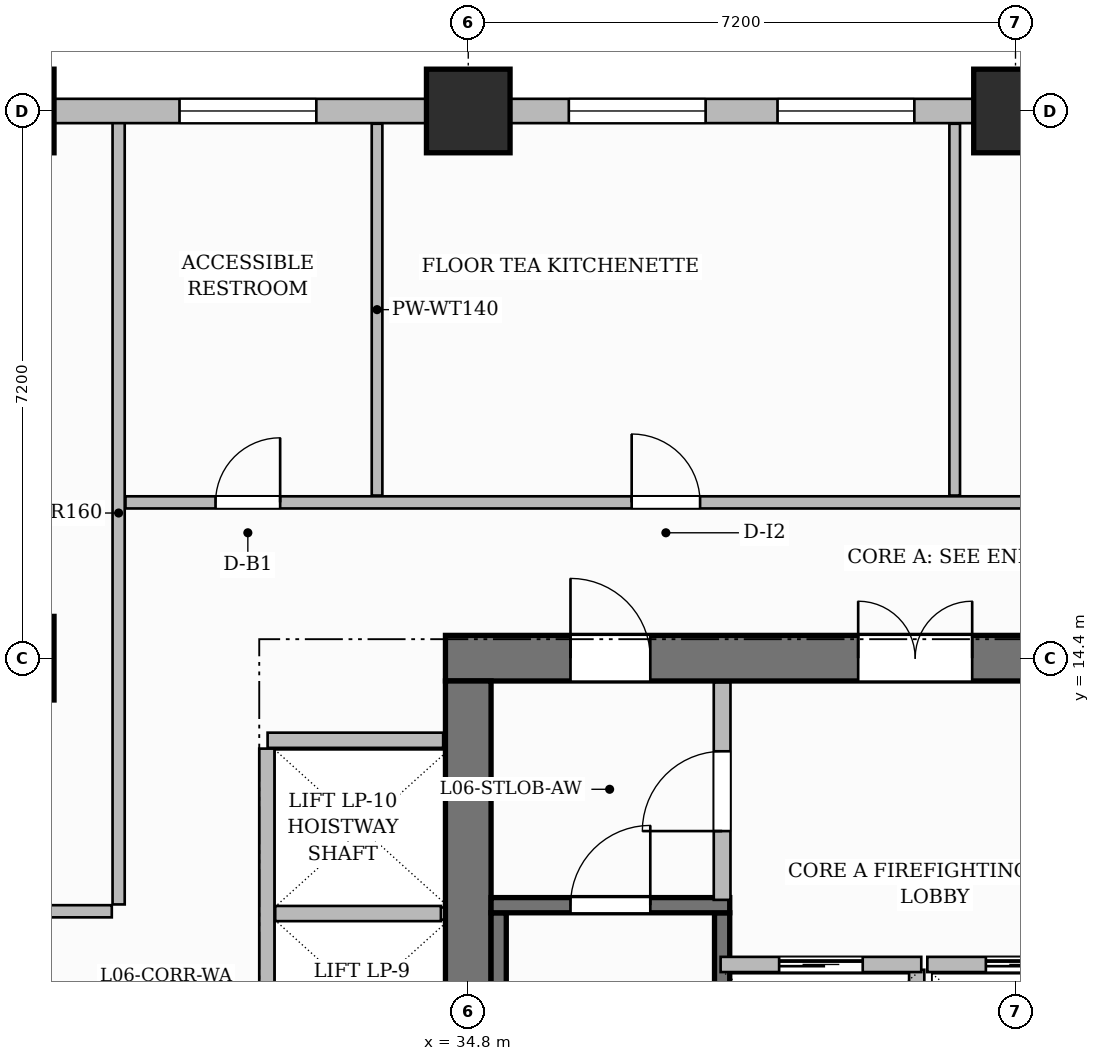
"""IFC4 building model, lengths in metres.
Left out: names, types, materials, properties, quantities, classifications, styles, units other than length and angle.
Written with IfcOpenShell. Run it as: python <this file> out.ifc"""

import sys

from ifc_helpers import new_model, si_unit, direction, frame, frame_2d, origin, origin_2d, place, context, subcontext, project, spatial, rectangle, extrude, source, transform, mapped, element, fill, save


model = new_model("IFC4")
c1 = context("Model", 3, precision=1e-05, world=origin(), true_north=direction((0.0, 1.0)))
c2 = subcontext(c1, "Body", "Model", "MODEL_VIEW")
j1 = project(units=[si_unit("LENGTHUNIT", "METRE"), si_unit("PLANEANGLEUNIT", "RADIAN")], contexts=[c1])
p1 = place(None, origin())
s1 = spatial("IfcSite", under=j1, at=p1, CompositionType="ELEMENT")
p2 = place(p1, origin())
s2 = spatial("IfcBuilding", under=s1, at=p2, CompositionType="ELEMENT")
p3 = place(p2, frame((0.0, 0.0, 32.4)))
s3 = spatial("IfcBuildingStorey", under=s2, at=p3, CompositionType="ELEMENT", Elevation=32.4)
p4 = place(p3, frame((34.5, 14.4, 0.0), z_axis=(0.0, 0.0, 1.0), x_axis=(1.0, 0.0, 0.0)))
e1 = element("IfcWall", 1, at=p4, inside=s3, PredefinedType="SHEAR", context=c2, shape_type="SweptSolid", body=[
    extrude(rectangle(XDim=15.6, YDim=0.6, at=frame_2d((7.8, 0.0))), origin(), (0.0, 0.0, 1.0), 3.7),
])
p5 = place(p4, frame((5.43, 0.0, 0.0)))
e2 = element("IfcOpeningElement", 2, at=p5, cuts=e1, PredefinedType="OPENING", context=c2, shape_type="SweptSolid", body=[
    extrude(rectangle(XDim=1.5, YDim=2.2, at=frame_2d((0.75, 1.1))), frame((0.0, 0.31, 0.0), z_axis=(0.0, -1.0, 0.0), x_axis=(1.0, 0.0, 0.0)), (0.0, 0.0, 1.0), 0.62),
])
p6 = place(p4, frame((1.645, 0.0, 0.0)))
e3 = element("IfcOpeningElement", 3, at=p6, cuts=e1, PredefinedType="OPENING", context=c2, shape_type="SweptSolid", body=[
    extrude(rectangle(XDim=1.05, YDim=2.15, at=frame_2d((0.525, 1.075))), frame((0.0, 0.31, 0.0), z_axis=(0.0, -1.0, 0.0), x_axis=(1.0, 0.0, 0.0)), (0.0, 0.0, 1.0), 0.62),
])
p7 = place(p4, frame((11.275, 0.0, 0.0)))
e4 = element("IfcOpeningElement", 4, at=p7, cuts=e1, PredefinedType="OPENING", context=c2, shape_type="SweptSolid", body=[
    extrude(rectangle(XDim=1.05, YDim=2.15, at=frame_2d((0.525, 1.075))), frame((0.0, 0.31, 0.0), z_axis=(0.0, -1.0, 0.0), x_axis=(1.0, 0.0, 0.0)), (0.0, 0.0, 1.0), 0.62),
])
p8 = place(p3, frame((34.8, 3.9, 0.0), z_axis=(0.0, 0.0, 1.0), x_axis=(0.0, 1.0, 0.0)))
e5 = element("IfcWall", 5, at=p8, inside=s3, PredefinedType="SHEAR", context=c2, shape_type="SweptSolid", body=[
    extrude(rectangle(XDim=10.2, YDim=0.6, at=frame_2d((5.1, 0.0))), origin(), (0.0, 0.0, 1.0), 3.7),
])
m1 = source(origin(), c2, "Body", "SweptSolid", [
    extrude(rectangle(XDim=1.1, YDim=1.1, at=origin_2d()), origin(), (0.0, 0.0, 1.0), 3.7),
])
for number, where, z_axis, x_axis in (
    (6, (28.8, 14.4, 0.0), (0.0, 0.0, 1.0), (1.0, 0.0, 0.0)),
    (7, (28.8, 21.6, 0.0), (0.0, 0.0, 1.0), (1.0, 0.0, 0.0)),
    (8, (34.8, 21.6, 0.0), (0.0, 0.0, 1.0), (1.0, 0.0, 0.0)),
    (9, (42.0, 21.6, 0.0), (0.0, 0.0, 1.0), (1.0, 0.0, 0.0)),
):
    element("IfcColumn", number, at=place(p3, frame(where, z_axis=z_axis, x_axis=x_axis)), inside=s3, PredefinedType="COLUMN", context=c2, shape_type="MappedRepresentation", body=[
        mapped(m1, transform((0.0, 0.0, 0.0), scale=1.0)),
    ])
for number, where, z_axis, x_axis in (
    (10, (35.2, 4.1, 0.0), (0.0, 0.0, 1.0), (0.0, 1.0, 0.0)),
    (11, (38.14, 4.1, 0.0), (0.0, 0.0, 1.0), (0.0, 1.0, 0.0)),
):
    element("IfcWall", number, at=place(p3, frame(where, z_axis=z_axis, x_axis=x_axis)), inside=s3, PredefinedType="SHEAR", context=c2, shape_type="SweptSolid", body=[
        extrude(rectangle(XDim=6.95, YDim=0.2, at=frame_2d((3.475, 0.0))), origin(), (0.0, 0.0, 1.0), 3.7),
    ])
p9 = place(p3, frame((35.1, 11.15, 0.0), z_axis=(0.0, 0.0, 1.0), x_axis=(1.0, 0.0, 0.0)))
e12 = element("IfcWall", 12, at=p9, inside=s3, PredefinedType="SHEAR", context=c2, shape_type="SweptSolid", body=[
    extrude(rectangle(XDim=3.14, YDim=0.2, at=frame_2d((1.57, 0.0))), origin(), (0.0, 0.0, 1.0), 3.7),
])
p10 = place(p9, frame((1.045, 0.0, 0.0)))
e13 = element("IfcOpeningElement", 13, at=p10, cuts=e12, PredefinedType="OPENING", context=c2, shape_type="SweptSolid", body=[
    extrude(rectangle(XDim=1.05, YDim=2.2, at=frame_2d((0.525, 1.1))), frame((0.0, 0.11, 0.0), z_axis=(0.0, -1.0, 0.0), x_axis=(1.0, 0.0, 0.0)), (0.0, 0.0, 1.0), 0.22),
])
p11 = place(p3, frame((40.7, 8.12, 0.0), z_axis=(0.0, 0.0, 1.0), x_axis=(0.0, 1.0, 0.0)))
e14 = element("IfcWall", 14, at=p11, inside=s3, PredefinedType="PARTITIONING", context=c2, shape_type="SweptSolid", body=[
    extrude(rectangle(XDim=2.18, YDim=0.2, at=frame_2d((1.09, 0.0))), origin(), (0.0, 0.0, 1.0), 3.45),
])
p12 = place(p3, frame((38.14, 11.22, 0.0), z_axis=(0.0, 0.0, 1.0), x_axis=(0.0, 1.0, 0.0)))
e15 = element("IfcWall", 15, at=p12, inside=s3, PredefinedType="PARTITIONING", context=c2, shape_type="SweptSolid", body=[
    extrude(rectangle(XDim=2.86, YDim=0.22, at=frame_2d((1.43, 0.0))), origin(), (0.0, 0.0, 1.0), 3.45),
])
p13 = place(p12, frame((0.905, 0.0, 0.0)))
e16 = element("IfcOpeningElement", 16, at=p13, cuts=e15, PredefinedType="OPENING", context=c2, shape_type="SweptSolid", body=[
    extrude(rectangle(XDim=1.05, YDim=2.15, at=frame_2d((0.525, 1.075))), frame((0.0, 0.12, 0.0), z_axis=(0.0, -1.0, 0.0), x_axis=(1.0, 0.0, 0.0)), (0.0, 0.0, 1.0), 0.24),
])
p14 = place(p3, frame((32.16, 13.32, 0.0), z_axis=(0.0, 0.0, 1.0), x_axis=(1.0, 0.0, 0.0)))
e17 = element("IfcWall", 17, at=p14, inside=s3, PredefinedType="PARTITIONING", context=c2, shape_type="SweptSolid", body=[
    extrude(rectangle(XDim=2.31, YDim=0.2, at=frame_2d((1.155, 0.0))), origin(), (0.0, 0.0, 1.0), 3.45),
])
p15 = place(p3, frame((32.15, 4.39, 0.0), z_axis=(0.0, 0.0, 1.0), x_axis=(0.0, 1.0, 0.0)))
e18 = element("IfcWall", 18, at=p15, inside=s3, PredefinedType="PARTITIONING", context=c2, shape_type="SweptSolid", body=[
    extrude(rectangle(XDim=8.82, YDim=0.2, at=frame_2d((4.41, 0.0))), origin(), (0.0, 0.0, 1.0), 3.45),
])
p16 = place(p3, frame((32.26, 11.04, 0.0), z_axis=(0.0, 0.0, 1.0), x_axis=(1.0, 0.0, 0.0)))
e19 = element("IfcWall", 19, at=p16, inside=s3, PredefinedType="PARTITIONING", context=c2, shape_type="SweptSolid", body=[
    extrude(rectangle(XDim=2.18, YDim=0.2, at=frame_2d((1.09, 0.0))), origin(), (0.0, 0.0, 1.0), 3.45),
])
p17 = place(p3, frame((14.568, 11.07, 0.0), z_axis=(0.0, 0.0, 1.0), x_axis=(1.0, 0.0, 0.0)))
e20 = element("IfcWall", 20, at=p17, inside=s3, PredefinedType="PARTITIONING", context=c2, shape_type="SweptSolid", body=[
    extrude(rectangle(XDim=15.542, YDim=0.16, at=frame_2d((7.771, 0.0))), origin(), (0.0, 0.0, 1.0), 3.45),
])
p18 = place(p17, frame((2.918, 0.0, 0.0)))
e21 = element("IfcOpeningElement", 21, at=p18, cuts=e20, PredefinedType="OPENING", context=c2, shape_type="SweptSolid", body=[
    extrude(rectangle(XDim=1.0, YDim=2.2, at=frame_2d((0.5, 1.1))), frame((0.0, 0.09, 0.0), z_axis=(0.0, -1.0, 0.0), x_axis=(1.0, 0.0, 0.0)), (0.0, 0.0, 1.0), 0.18),
])
p19 = place(p17, frame((6.647, 0.0, 0.0)))
e22 = element("IfcOpeningElement", 22, at=p19, cuts=e20, PredefinedType="OPENING", context=c2, shape_type="SweptSolid", body=[
    extrude(rectangle(XDim=1.05, YDim=2.25, at=frame_2d((0.525, 1.125))), frame((0.0, 0.09, 0.0), z_axis=(0.0, -1.0, 0.0), x_axis=(1.0, 0.0, 0.0)), (0.0, 0.0, 1.0), 0.18),
])
p20 = place(p3, frame((30.2, 11.16, 0.0), z_axis=(0.0, 0.0, 1.0), x_axis=(0.0, 1.0, 0.0)))
e23 = element("IfcWall", 23, at=p20, inside=s3, PredefinedType="PARTITIONING", context=c2, shape_type="SweptSolid", body=[
    extrude(rectangle(XDim=10.3, YDim=0.16, at=frame_2d((5.15, 0.0))), origin(), (0.0, 0.0, 1.0), 3.45),
])
p21 = place(p3, frame((30.29, 16.45, 0.0), z_axis=(0.0, 0.0, 1.0), x_axis=(1.0, 0.0, 0.0)))
e24 = element("IfcWall", 24, at=p21, inside=s3, PredefinedType="PARTITIONING", context=c2, shape_type="SweptSolid", body=[
    extrude(rectangle(XDim=19.37, YDim=0.16, at=frame_2d((9.685, 0.0))), origin(), (0.0, 0.0, 1.0), 3.45),
])
p22 = place(p21, frame((1.185, 0.0, 0.0)))
e25 = element("IfcOpeningElement", 25, at=p22, cuts=e24, PredefinedType="OPENING", context=c2, shape_type="SweptSolid", body=[
    extrude(rectangle(XDim=0.85, YDim=2.1, at=frame_2d((0.425, 1.05))), frame((0.0, 0.09, 0.0), z_axis=(0.0, -1.0, 0.0), x_axis=(1.0, 0.0, 0.0)), (0.0, 0.0, 1.0), 0.18),
])
p23 = place(p21, frame((6.66, 0.0, 0.0)))
e26 = element("IfcOpeningElement", 26, at=p23, cuts=e24, PredefinedType="OPENING", context=c2, shape_type="SweptSolid", body=[
    extrude(rectangle(XDim=0.9, YDim=2.15, at=frame_2d((0.45, 1.075))), frame((0.0, 0.09, 0.0), z_axis=(0.0, -1.0, 0.0), x_axis=(1.0, 0.0, 0.0)), (0.0, 0.0, 1.0), 0.18),
])
p24 = place(p21, frame((14.46, 0.0, 0.0)))
e27 = element("IfcOpeningElement", 27, at=p24, cuts=e24, PredefinedType="OPENING", context=c2, shape_type="SweptSolid", body=[
    extrude(rectangle(XDim=1.4, YDim=2.35, at=frame_2d((0.7, 1.175))), frame((0.0, 0.09, 0.0), z_axis=(0.0, -1.0, 0.0), x_axis=(1.0, 0.0, 0.0)), (0.0, 0.0, 1.0), 0.18),
])
for number, where, z_axis, x_axis in (
    (28, (33.6, 16.54, 0.0), (0.0, 0.0, 1.0), (0.0, 1.0, 0.0)),
    (29, (41.2, 16.54, 0.0), (0.0, 0.0, 1.0), (0.0, 1.0, 0.0)),
):
    element("IfcWall", number, at=place(p3, frame(where, z_axis=z_axis, x_axis=x_axis)), inside=s3, PredefinedType="PARTITIONING", context=c2, shape_type="SweptSolid", body=[
        extrude(rectangle(XDim=4.892, YDim=0.14, at=frame_2d((2.446, 0.0))), origin(), (0.0, 0.0, 1.0), 3.45),
    ])
p25 = place(p3, frame((38.12, 10.37, 0.0), z_axis=(0.0, 0.0, 1.0), x_axis=(1.0, 0.0, 0.0)))
e30 = element("IfcWall", 30, at=p25, inside=s3, PredefinedType="PARTITIONING", context=c2, shape_type="SweptSolid", body=[
    extrude(rectangle(XDim=2.64, YDim=0.2, at=frame_2d((1.32, 0.0))), origin(), (0.0, 0.0, 1.0), 3.45),
])
p26 = place(p25, frame((0.77, 0.0, 0.0)))
e31 = element("IfcOpeningElement", 31, at=p26, cuts=e30, PredefinedType="OPENING", context=c2, shape_type="SweptSolid", body=[
    extrude(rectangle(XDim=1.1, YDim=2.2, at=frame_2d((0.55, 1.1))), frame((0.0, 0.11, 0.0), z_axis=(0.0, -1.0, 0.0), x_axis=(1.0, 0.0, 0.0)), (0.0, 0.0, 1.0), 0.22),
])
p27 = place(p3, frame((40.84, 10.37, 0.0), z_axis=(0.0, 0.0, 1.0), x_axis=(1.0, 0.0, 0.0)))
e32 = element("IfcWall", 32, at=p27, inside=s3, PredefinedType="PARTITIONING", context=c2, shape_type="SweptSolid", body=[
    extrude(rectangle(XDim=2.64, YDim=0.2, at=frame_2d((1.32, 0.0))), origin(), (0.0, 0.0, 1.0), 3.45),
])
p28 = place(p27, frame((0.77, 0.0, 0.0)))
e33 = element("IfcOpeningElement", 33, at=p28, cuts=e32, PredefinedType="OPENING", context=c2, shape_type="SweptSolid", body=[
    extrude(rectangle(XDim=1.1, YDim=2.2, at=frame_2d((0.55, 1.1))), frame((0.0, 0.11, 0.0), z_axis=(0.0, -1.0, 0.0), x_axis=(1.0, 0.0, 0.0)), (0.0, 0.0, 1.0), 0.22),
])
p29 = place(p3, frame((14.4, 21.6, 0.0), z_axis=(0.0, 0.0, 1.0), x_axis=(1.0, 0.0, 0.0)))
e34 = element("IfcWall", 34, at=p29, inside=s3, PredefinedType="SOLIDWALL", context=c2, shape_type="SweptSolid", body=[
    extrude(rectangle(XDim=43.2, YDim=0.32, at=frame_2d((21.6, 0.0))), origin(), (0.0, 0.0, 1.0), 2.885),
])
p30 = place(p29, frame((1.5, 0.0, 0.0)))
e35 = element("IfcOpeningElement", 35, at=p30, cuts=e34, PredefinedType="OPENING", context=c2, shape_type="SweptSolid", body=[
    extrude(rectangle(XDim=1.2, YDim=2.2, at=frame_2d((0.6, 1.1))), frame((0.0, 0.17, 0.0), z_axis=(0.0, -1.0, 0.0), x_axis=(1.0, 0.0, 0.0)), (0.0, 0.0, 1.0), 0.34),
])
p31 = place(p29, frame((3.336, 0.0, 0.8)))
e36 = element("IfcOpeningElement", 36, at=p31, cuts=e34, PredefinedType="OPENING", context=c2, shape_type="SweptSolid", body=[
    extrude(rectangle(XDim=1.4, YDim=1.85, at=frame_2d((0.7, 0.925))), frame((0.0, 0.17, 0.0), z_axis=(0.0, -1.0, 0.0), x_axis=(1.0, 0.0, 0.0)), (0.0, 0.0, 1.0), 0.34),
])
p32 = place(p29, frame((5.269, 0.0, 0.8)))
e37 = element("IfcOpeningElement", 37, at=p32, cuts=e34, PredefinedType="OPENING", context=c2, shape_type="SweptSolid", body=[
    extrude(rectangle(XDim=0.95, YDim=1.75, at=frame_2d((0.475, 0.875))), frame((0.0, 0.17, 0.0), z_axis=(0.0, -1.0, 0.0), x_axis=(1.0, 0.0, 0.0)), (0.0, 0.0, 1.0), 0.34),
])
p33 = place(p29, frame((8.525, 0.0, 0.8)))
e38 = element("IfcOpeningElement", 38, at=p33, cuts=e34, PredefinedType="OPENING", context=c2, shape_type="SweptSolid", body=[
    extrude(rectangle(XDim=1.8, YDim=1.85, at=frame_2d((0.9, 0.925))), frame((0.0, 0.17, 0.0), z_axis=(0.0, -1.0, 0.0), x_axis=(1.0, 0.0, 0.0)), (0.0, 0.0, 1.0), 0.34),
])
p34 = place(p29, frame((11.275, 0.0, 0.8)))
e39 = element("IfcOpeningElement", 39, at=p34, cuts=e34, PredefinedType="OPENING", context=c2, shape_type="SweptSolid", body=[
    extrude(rectangle(XDim=1.8, YDim=1.85, at=frame_2d((0.9, 0.925))), frame((0.0, 0.17, 0.0), z_axis=(0.0, -1.0, 0.0), x_axis=(1.0, 0.0, 0.0)), (0.0, 0.0, 1.0), 0.34),
])
p35 = place(p29, frame((16.601, 0.0, 0.8)))
e40 = element("IfcOpeningElement", 40, at=p35, cuts=e34, PredefinedType="OPENING", context=c2, shape_type="SweptSolid", body=[
    extrude(rectangle(XDim=1.8, YDim=1.85, at=frame_2d((0.9, 0.925))), frame((0.0, 0.17, 0.0), z_axis=(0.0, -1.0, 0.0), x_axis=(1.0, 0.0, 0.0)), (0.0, 0.0, 1.0), 0.34),
])
p36 = place(p29, frame((21.723, 0.0, 0.8)))
e41 = element("IfcOpeningElement", 41, at=p36, cuts=e34, PredefinedType="OPENING", context=c2, shape_type="SweptSolid", body=[
    extrude(rectangle(XDim=1.8, YDim=1.85, at=frame_2d((0.9, 0.925))), frame((0.0, 0.17, 0.0), z_axis=(0.0, -1.0, 0.0), x_axis=(1.0, 0.0, 0.0)), (0.0, 0.0, 1.0), 0.34),
])
p37 = place(p29, frame((24.469, 0.0, 0.8)))
e42 = element("IfcOpeningElement", 42, at=p37, cuts=e34, PredefinedType="OPENING", context=c2, shape_type="SweptSolid", body=[
    extrude(rectangle(XDim=1.8, YDim=1.85, at=frame_2d((0.9, 0.925))), frame((0.0, 0.17, 0.0), z_axis=(0.0, -1.0, 0.0), x_axis=(1.0, 0.0, 0.0)), (0.0, 0.0, 1.0), 0.34),
])
p38 = place(p29, frame((29.075, 0.0, 0.8)))
e43 = element("IfcOpeningElement", 43, at=p38, cuts=e34, PredefinedType="OPENING", context=c2, shape_type="SweptSolid", body=[
    extrude(rectangle(XDim=1.8, YDim=1.85, at=frame_2d((0.9, 0.925))), frame((0.0, 0.17, 0.0), z_axis=(0.0, -1.0, 0.0), x_axis=(1.0, 0.0, 0.0)), (0.0, 0.0, 1.0), 0.34),
])
p39 = place(p29, frame((32.125, 0.0, 0.8)))
e44 = element("IfcOpeningElement", 44, at=p39, cuts=e34, PredefinedType="OPENING", context=c2, shape_type="SweptSolid", body=[
    extrude(rectangle(XDim=1.8, YDim=1.85, at=frame_2d((0.9, 0.925))), frame((0.0, 0.17, 0.0), z_axis=(0.0, -1.0, 0.0), x_axis=(1.0, 0.0, 0.0)), (0.0, 0.0, 1.0), 0.34),
])
p40 = place(p29, frame((36.875, 0.0, 0.8)))
e45 = element("IfcOpeningElement", 45, at=p40, cuts=e34, PredefinedType="OPENING", context=c2, shape_type="SweptSolid", body=[
    extrude(rectangle(XDim=1.8, YDim=1.85, at=frame_2d((0.9, 0.925))), frame((0.0, 0.17, 0.0), z_axis=(0.0, -1.0, 0.0), x_axis=(1.0, 0.0, 0.0)), (0.0, 0.0, 1.0), 0.34),
])
p41 = place(p29, frame((39.925, 0.0, 0.8)))
e46 = element("IfcOpeningElement", 46, at=p41, cuts=e34, PredefinedType="OPENING", context=c2, shape_type="SweptSolid", body=[
    extrude(rectangle(XDim=1.8, YDim=1.85, at=frame_2d((0.9, 0.925))), frame((0.0, 0.17, 0.0), z_axis=(0.0, -1.0, 0.0), x_axis=(1.0, 0.0, 0.0)), (0.0, 0.0, 1.0), 0.34),
])
m2 = source(origin(), c2, "Body", "SweptSolid", [
    extrude(rectangle(XDim=1.05, YDim=2.2, at=frame_2d((0.525, 1.1))), frame((0.0, 0.025, 0.0), z_axis=(0.0, -1.0, 0.0), x_axis=(1.0, 0.0, 0.0)), (0.0, 0.0, 1.0), 0.05),
])
p42 = place(p10, origin())
e47 = element("IfcDoor", 47, at=p42, inside=s3, OperationType="SINGLE_SWING_RIGHT", PredefinedType="DOOR", context=c2, shape_type="MappedRepresentation", body=[
    mapped(m2, transform((0.0, 0.0, 0.0), scale=1.0)),
])
fill(e13, e47)
m3 = source(origin(), c2, "Body", "SweptSolid", [
    extrude(rectangle(XDim=1.05, YDim=2.15, at=frame_2d((0.525, 1.075))), frame((0.0, 0.025, 0.0), z_axis=(0.0, -1.0, 0.0), x_axis=(1.0, 0.0, 0.0)), (0.0, 0.0, 1.0), 0.05),
])
p43 = place(p13, origin())
e48 = element("IfcDoor", 48, at=p43, inside=s3, OperationType="SINGLE_SWING_LEFT", PredefinedType="DOOR", context=c2, shape_type="MappedRepresentation", body=[
    mapped(m3, transform((0.0, 0.0, 0.0), scale=1.0)),
])
fill(e16, e48)
m4 = source(origin(), c2, "Body", "SweptSolid", [
    extrude(rectangle(XDim=1.5, YDim=2.2, at=frame_2d((0.75, 1.1))), frame((0.0, 0.025, 0.0), z_axis=(0.0, -1.0, 0.0), x_axis=(1.0, 0.0, 0.0)), (0.0, 0.0, 1.0), 0.05),
])
p44 = place(p5, origin())
e49 = element("IfcDoor", 49, at=p44, inside=s3, OperationType="DOUBLE_DOOR_SINGLE_SWING", PredefinedType="DOOR", context=c2, shape_type="MappedRepresentation", body=[
    mapped(m4, transform((0.0, 0.0, 0.0), scale=1.0)),
])
fill(e2, e49)
p45 = place(p6, origin())
e50 = element("IfcDoor", 50, at=p45, inside=s3, OperationType="SINGLE_SWING_LEFT", PredefinedType="DOOR", context=c2, shape_type="MappedRepresentation", body=[
    mapped(m3, transform((0.0, 0.0, 0.0), scale=1.0)),
])
fill(e3, e50)
m5 = source(origin(), c2, "Body", "SweptSolid", [
    extrude(rectangle(XDim=0.85, YDim=2.1, at=frame_2d((0.425, 1.05))), frame((0.0, 0.025, 0.0), z_axis=(0.0, -1.0, 0.0), x_axis=(1.0, 0.0, 0.0)), (0.0, 0.0, 1.0), 0.05),
])
p46 = place(p22, origin())
e51 = element("IfcDoor", 51, at=p46, inside=s3, OperationType="SINGLE_SWING_RIGHT", PredefinedType="DOOR", context=c2, shape_type="MappedRepresentation", body=[
    mapped(m5, transform((0.0, 0.0, 0.0), scale=1.0)),
])
fill(e25, e51)
m6 = source(origin(), c2, "Body", "SweptSolid", [
    extrude(rectangle(XDim=0.9, YDim=2.15, at=frame_2d((0.45, 1.075))), frame((0.0, 0.025, 0.0), z_axis=(0.0, -1.0, 0.0), x_axis=(1.0, 0.0, 0.0)), (0.0, 0.0, 1.0), 0.05),
])
p47 = place(p23, origin())
e52 = element("IfcDoor", 52, at=p47, inside=s3, OperationType="SINGLE_SWING_LEFT", PredefinedType="DOOR", context=c2, shape_type="MappedRepresentation", body=[
    mapped(m6, transform((0.0, 0.0, 0.0), scale=1.0)),
])
fill(e26, e52)
m7 = source(origin(), c2, "Body", "SweptSolid", [
    extrude(rectangle(XDim=1.1, YDim=2.2, at=frame_2d((0.55, 1.1))), frame((0.0, 0.025, 0.0), z_axis=(0.0, -1.0, 0.0), x_axis=(1.0, 0.0, 0.0)), (0.0, 0.0, 1.0), 0.05),
])
p48 = place(p26, origin())
e53 = element("IfcDoor", 53, at=p48, inside=s3, OperationType="SLIDING_TO_LEFT", PredefinedType="DOOR", context=c2, shape_type="MappedRepresentation", body=[
    mapped(m7, transform((0.0, 0.0, 0.0), scale=1.0)),
])
fill(e31, e53)
p49 = place(p28, origin())
e54 = element("IfcDoor", 54, at=p49, inside=s3, OperationType="SLIDING_TO_LEFT", PredefinedType="DOOR", context=c2, shape_type="MappedRepresentation", body=[
    mapped(m7, transform((0.0, 0.0, 0.0), scale=1.0)),
])
fill(e33, e54)
m8 = source(origin(), c2, "Body", "SweptSolid", [
    extrude(rectangle(XDim=1.8, YDim=1.85, at=frame_2d((0.9, 0.925))), frame((0.0, 0.03, 0.0), z_axis=(0.0, -1.0, 0.0), x_axis=(1.0, 0.0, 0.0)), (0.0, 0.0, 1.0), 0.06),
])
p50 = place(p35, origin())
e55 = element("IfcWindow", 55, at=p50, inside=s3, PartitioningType="DOUBLE_PANEL_VERTICAL", PredefinedType="WINDOW", context=c2, shape_type="MappedRepresentation", body=[
    mapped(m8, transform((0.0, 0.0, 0.0), scale=1.0)),
])
fill(e40, e55)
p51 = place(p36, origin())
e56 = element("IfcWindow", 56, at=p51, inside=s3, PartitioningType="DOUBLE_PANEL_VERTICAL", PredefinedType="WINDOW", context=c2, shape_type="MappedRepresentation", body=[
    mapped(m8, transform((0.0, 0.0, 0.0), scale=1.0)),
])
fill(e41, e56)
p52 = place(p37, origin())
e57 = element("IfcWindow", 57, at=p52, inside=s3, PartitioningType="DOUBLE_PANEL_VERTICAL", PredefinedType="WINDOW", context=c2, shape_type="MappedRepresentation", body=[
    mapped(m8, transform((0.0, 0.0, 0.0), scale=1.0)),
])
fill(e42, e57)
save(model, sys.argv[1])
